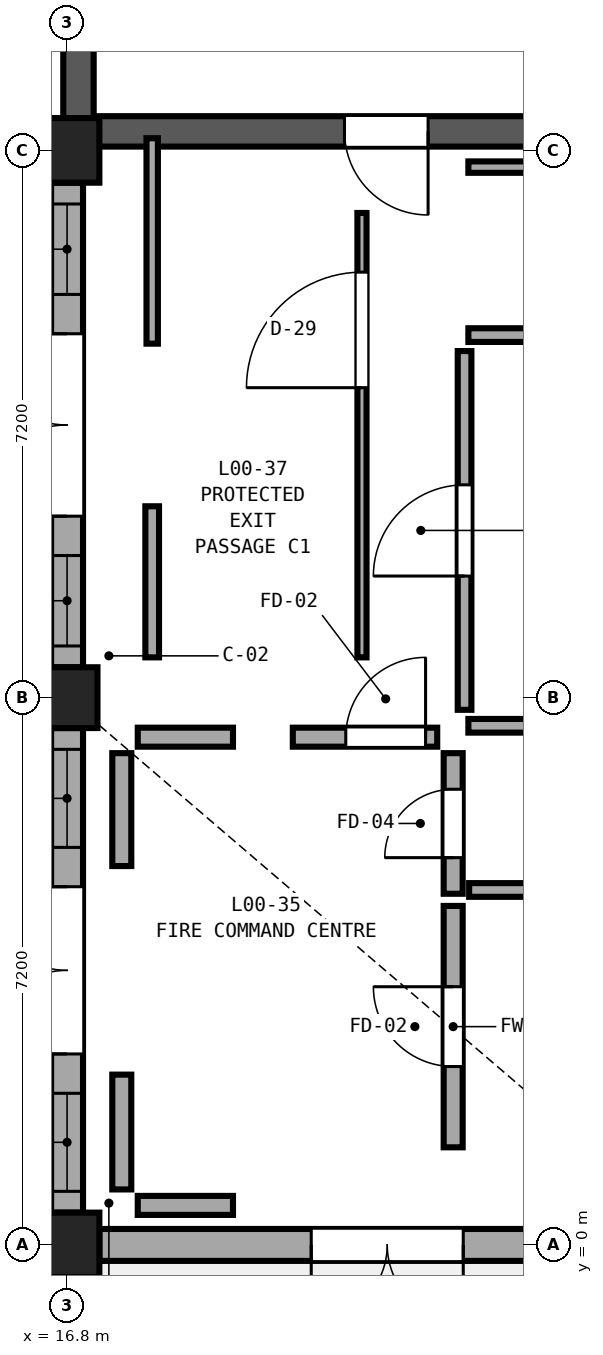
"""IFC4 building model, lengths in metres.
Left out: names, types, materials, properties, quantities, classifications, styles, units other than length and angle.
Written with IfcOpenShell. Run it as: python <this file> out.ifc"""

import sys

from ifc_helpers import new_model, si_unit, direction, frame, frame_2d, origin, origin_2d, place, context, subcontext, project, spatial, rectangle, extrude, element, fill, save


model = new_model("IFC4")
c1 = context("Model", 3, precision=1e-05, world=origin(), true_north=direction((0.0, 1.0)))
c2 = subcontext(c1, "Body", "Model", "MODEL_VIEW")
j1 = project(units=[si_unit("LENGTHUNIT", "METRE"), si_unit("PLANEANGLEUNIT", "RADIAN")], contexts=[c1])
p1 = place(None, origin())
s1 = spatial("IfcSite", under=j1, at=p1, CompositionType="ELEMENT")
p2 = place(p1, origin())
s2 = spatial("IfcBuilding", under=s1, at=p2, CompositionType="ELEMENT")
p3 = place(p2, origin())
s3 = spatial("IfcBuildingStorey", under=s2, at=p3, CompositionType="ELEMENT", Elevation=0.0)
p4 = place(p3, frame((16.8, 0.0, 0.0), z_axis=(0.0, 0.0, 1.0), x_axis=(1.0, 0.0, 0.0)))
e1 = element("IfcColumn", 1, at=p4, inside=s3, PredefinedType="COLUMN", context=c2, shape_type="SweptSolid", body=[
    extrude(rectangle(XDim=0.85, YDim=0.85, at=origin_2d()), origin(), (0.0, 0.0, 1.0), 5.4),
])
p5 = place(p3, frame((16.8, 7.2, 0.0), z_axis=(0.0, 0.0, 1.0), x_axis=(1.0, 0.0, 0.0)))
e2 = element("IfcColumn", 2, at=p5, inside=s3, PredefinedType="COLUMN", context=c2, shape_type="SweptSolid", body=[
    extrude(rectangle(XDim=0.8, YDim=0.8, at=origin_2d()), origin(), (0.0, 0.0, 1.0), 5.4),
])
p6 = place(p3, frame((16.8, 14.4, 0.0), z_axis=(0.0, 0.0, 1.0), x_axis=(1.0, 0.0, 0.0)))
e3 = element("IfcColumn", 3, at=p6, inside=s3, PredefinedType="COLUMN", context=c2, shape_type="SweptSolid", body=[
    extrude(rectangle(XDim=0.85, YDim=0.85, at=origin_2d()), origin(), (0.0, 0.0, 1.0), 5.4),
])
p7 = place(p3, frame((24.8, 0.0, 0.0), z_axis=(0.0, 0.0, 1.0), x_axis=(-1.0, 0.0, 0.0)))
e4 = element("IfcWall", 4, at=p7, inside=s3, PredefinedType="SOLIDWALL", context=c2, shape_type="SweptSolid", body=[
    extrude(rectangle(XDim=7.575, YDim=0.42, at=frame_2d((3.788, 0.0))), origin(), (0.0, 0.0, 1.0), 4.53),
])
p8 = place(p7, frame((2.788, 0.0, 0.0)))
e5 = element("IfcOpeningElement", 5, at=p8, cuts=e4, PredefinedType="OPENING", context=c2, shape_type="SweptSolid", body=[
    extrude(rectangle(XDim=2.0, YDim=2.4, at=frame_2d((1.0, 1.2))), frame((0.0, 0.23, 0.0), z_axis=(0.0, -1.0, 0.0), x_axis=(1.0, 0.0, 0.0)), (0.0, 0.0, 1.0), 0.46),
])
p9 = place(p3, frame((16.8, 0.425, 0.0), z_axis=(0.0, 0.0, 1.0), x_axis=(0.0, 1.0, 0.0)))
e6 = element("IfcWall", 6, at=p9, inside=s3, PredefinedType="SOLIDWALL", context=c2, shape_type="SweptSolid", body=[
    extrude(rectangle(XDim=6.375, YDim=0.42, at=frame_2d((3.188, 0.0))), origin(), (0.0, 0.0, 1.0), 4.53),
])
p10 = place(p9, frame((2.087, 0.0, 0.0)))
e7 = element("IfcOpeningElement", 7, at=p10, cuts=e6, PredefinedType="OPENING", context=c2, shape_type="SweptSolid", body=[
    extrude(rectangle(XDim=2.2, YDim=2.5, at=frame_2d((1.1, 1.25))), frame((0.0, 0.23, 0.0), z_axis=(0.0, -1.0, 0.0), x_axis=(1.0, 0.0, 0.0)), (0.0, 0.0, 1.0), 0.46),
])
p11 = place(p9, frame((0.28, 0.0, 0.65)))
e8 = element("IfcOpeningElement", 8, at=p11, cuts=e6, PredefinedType="OPENING", context=c2, shape_type="SweptSolid", body=[
    extrude(rectangle(XDim=1.29, YDim=2.68, at=frame_2d((0.645, 1.34))), frame((0.0, 0.23, 0.0), z_axis=(0.0, -1.0, 0.0), x_axis=(1.0, 0.0, 0.0)), (0.0, 0.0, 1.0), 0.46),
])
p12 = place(p9, frame((4.805, 0.0, 0.65)))
e9 = element("IfcOpeningElement", 9, at=p12, cuts=e6, PredefinedType="OPENING", context=c2, shape_type="SweptSolid", body=[
    extrude(rectangle(XDim=1.29, YDim=2.68, at=frame_2d((0.645, 1.34))), frame((0.0, 0.23, 0.0), z_axis=(0.0, -1.0, 0.0), x_axis=(1.0, 0.0, 0.0)), (0.0, 0.0, 1.0), 0.46),
])
p13 = place(p3, frame((16.8, 7.6, 0.0), z_axis=(0.0, 0.0, 1.0), x_axis=(0.0, 1.0, 0.0)))
e10 = element("IfcWall", 10, at=p13, inside=s3, PredefinedType="SOLIDWALL", context=c2, shape_type="SweptSolid", body=[
    extrude(rectangle(XDim=6.375, YDim=0.42, at=frame_2d((3.188, 0.0))), origin(), (0.0, 0.0, 1.0), 4.53),
])
p14 = place(p13, frame((1.988, 0.0, 0.0)))
e11 = element("IfcOpeningElement", 11, at=p14, cuts=e10, PredefinedType="OPENING", context=c2, shape_type="SweptSolid", body=[
    extrude(rectangle(XDim=2.4, YDim=2.6, at=frame_2d((1.2, 1.3))), frame((0.0, 0.23, 0.0), z_axis=(0.0, -1.0, 0.0), x_axis=(1.0, 0.0, 0.0)), (0.0, 0.0, 1.0), 0.46),
])
p15 = place(p13, frame((0.28, 0.0, 0.65)))
e12 = element("IfcOpeningElement", 12, at=p15, cuts=e10, PredefinedType="OPENING", context=c2, shape_type="SweptSolid", body=[
    extrude(rectangle(XDim=1.19, YDim=2.68, at=frame_2d((0.595, 1.34))), frame((0.0, 0.23, 0.0), z_axis=(0.0, -1.0, 0.0), x_axis=(1.0, 0.0, 0.0)), (0.0, 0.0, 1.0), 0.46),
])
p16 = place(p13, frame((4.905, 0.0, 0.65)))
e13 = element("IfcOpeningElement", 13, at=p16, cuts=e10, PredefinedType="OPENING", context=c2, shape_type="SweptSolid", body=[
    extrude(rectangle(XDim=1.19, YDim=2.68, at=frame_2d((0.595, 1.34))), frame((0.0, 0.23, 0.0), z_axis=(0.0, -1.0, 0.0), x_axis=(1.0, 0.0, 0.0)), (0.0, 0.0, 1.0), 0.46),
])
p17 = place(p3, frame((24.85, 14.65, 0.0), z_axis=(0.0, 0.0, 1.0), x_axis=(-1.0, 0.0, 0.0)))
e14 = element("IfcWall", 14, at=p17, inside=s3, PredefinedType="SHEAR", context=c2, shape_type="SweptSolid", body=[
    extrude(rectangle(XDim=7.7, YDim=0.4, at=frame_2d((3.85, 0.0))), origin(), (0.0, 0.0, 1.0), 5.4),
])
p18 = place(p17, frame((3.3, 0.0, 0.0)))
e15 = element("IfcOpeningElement", 15, at=p18, cuts=e14, PredefinedType="OPENING", context=c2, shape_type="SweptSolid", body=[
    extrude(rectangle(XDim=1.1, YDim=2.2, at=frame_2d((0.55, 1.1))), frame((0.0, 0.22, 0.0), z_axis=(0.0, -1.0, 0.0), x_axis=(1.0, 0.0, 0.0)), (0.0, 0.0, 1.0), 0.44),
])
p19 = place(p3, frame((16.95, 22.9, 0.0), z_axis=(0.0, 0.0, 1.0), x_axis=(0.0, -1.0, 0.0)))
e16 = element("IfcWall", 16, at=p19, inside=s3, PredefinedType="SHEAR", context=c2, shape_type="SweptSolid", body=[
    extrude(rectangle(XDim=8.45, YDim=0.4, at=frame_2d((4.225, 0.0))), origin(), (0.0, 0.0, 1.0), 5.4),
])
p20 = place(p3, frame((22.08, 6.83, 0.0), z_axis=(0.0, 0.0, 1.0), x_axis=(1.0, 0.0, 0.0)))
e17 = element("IfcWall", 17, at=p20, inside=s3, PredefinedType="PARTITIONING", context=c2, shape_type="SweptSolid", body=[
    extrude(rectangle(XDim=2.675, YDim=0.18, at=frame_2d((1.337, 0.0))), origin(), (0.0, 0.0, 1.0), 4.58),
])
p21 = place(p3, frame((22.08, 11.97, 0.0), z_axis=(0.0, 0.0, 1.0), x_axis=(1.0, 0.0, 0.0)))
e18 = element("IfcWall", 18, at=p21, inside=s3, PredefinedType="PARTITIONING", context=c2, shape_type="SweptSolid", body=[
    extrude(rectangle(XDim=11.98, YDim=0.18, at=frame_2d((5.99, 0.0))), origin(), (0.0, 0.0, 1.0), 5.08),
])
p22 = place(p21, frame((5.15, 0.0, 0.0)))
e19 = element("IfcOpeningElement", 19, at=p22, cuts=e18, PredefinedType="OPENING", context=c2, shape_type="SweptSolid", body=[
    extrude(rectangle(XDim=1.68, YDim=2.29, at=frame_2d((0.84, 1.145))), frame((0.0, 0.11, 0.0), z_axis=(0.0, -1.0, 0.0), x_axis=(1.0, 0.0, 0.0)), (0.0, 0.0, 1.0), 0.22),
])
p23 = place(p3, frame((22.08, 14.18, 0.0), z_axis=(0.0, 0.0, 1.0), x_axis=(1.0, 0.0, 0.0)))
e20 = element("IfcWall", 20, at=p23, inside=s3, PredefinedType="PARTITIONING", context=c2, shape_type="SweptSolid", body=[
    extrude(rectangle(XDim=2.7, YDim=0.15, at=frame_2d((1.35, 0.0))), origin(), (0.0, 0.0, 1.0), 4.58),
])
p24 = place(p3, frame((20.68, 7.73, 0.0), z_axis=(0.0, 0.0, 1.0), x_axis=(0.0, 1.0, 0.0)))
e21 = element("IfcWall", 21, at=p24, inside=s3, PredefinedType="PARTITIONING", context=c2, shape_type="SweptSolid", body=[
    extrude(rectangle(XDim=5.847, YDim=0.12, at=frame_2d((2.923, 0.0))), origin(), (0.0, 0.0, 1.0), 5.08),
])
p25 = place(p24, frame((3.548, 0.0, 0.0)))
e22 = element("IfcOpeningElement", 22, at=p25, cuts=e21, PredefinedType="OPENING", context=c2, shape_type="SweptSolid", body=[
    extrude(rectangle(XDim=1.52, YDim=2.37, at=frame_2d((0.76, 1.185))), frame((0.0, 0.08, 0.0), z_axis=(0.0, -1.0, 0.0), x_axis=(1.0, 0.0, 0.0)), (0.0, 0.0, 1.0), 0.16),
])
p26 = place(p3, frame((17.92, 7.73, 0.0), z_axis=(0.0, 0.0, 1.0), x_axis=(0.0, 1.0, 0.0)))
e23 = element("IfcWall", 23, at=p26, inside=s3, PredefinedType="PARTITIONING", context=c2, shape_type="SweptSolid", body=[
    extrude(rectangle(XDim=1.988, YDim=0.18, at=frame_2d((0.994, 0.0))), origin(), (0.0, 0.0, 1.0), 5.08),
])
p27 = place(p3, frame((17.92, 11.857, 0.0), z_axis=(0.0, 0.0, 1.0), x_axis=(0.0, 1.0, 0.0)))
e24 = element("IfcWall", 24, at=p27, inside=s3, PredefinedType="PARTITIONING", context=c2, shape_type="SweptSolid", body=[
    extrude(rectangle(XDim=2.703, YDim=0.15, at=frame_2d((1.352, 0.0))), origin(), (0.0, 0.0, 1.0), 5.08),
])
p28 = place(p3, frame((22.03, 7.04, 0.0), z_axis=(0.0, 0.0, 1.0), x_axis=(0.0, 1.0, 0.0)))
e25 = element("IfcWall", 25, at=p28, inside=s3, PredefinedType="PARTITIONING", context=c2, shape_type="SweptSolid", body=[
    extrude(rectangle(XDim=4.72, YDim=0.18, at=frame_2d((2.36, 0.0))), origin(), (0.0, 0.0, 1.0), 5.08),
])
p29 = place(p28, frame((1.76, 0.0, 0.0)))
e26 = element("IfcOpeningElement", 26, at=p29, cuts=e25, PredefinedType="OPENING", context=c2, shape_type="SweptSolid", body=[
    extrude(rectangle(XDim=1.2, YDim=2.21, at=frame_2d((0.6, 1.105))), frame((0.0, 0.11, 0.0), z_axis=(0.0, -1.0, 0.0), x_axis=(1.0, 0.0, 0.0)), (0.0, 0.0, 1.0), 0.22),
])
p30 = place(p3, frame((21.88, 1.284, 0.0), z_axis=(0.0, 0.0, 1.0), x_axis=(0.0, 1.0, 0.0)))
e27 = element("IfcWall", 27, at=p30, inside=s3, PredefinedType="SOLIDWALL", context=c2, shape_type="SweptSolid", body=[
    extrude(rectangle(XDim=3.176, YDim=0.25, at=frame_2d((1.588, 0.0))), origin(), (0.0, 0.0, 1.0), 5.08),
])
p31 = place(p30, frame((1.063, 0.0, 0.0)))
e28 = element("IfcOpeningElement", 28, at=p31, cuts=e27, PredefinedType="OPENING", context=c2, shape_type="SweptSolid", body=[
    extrude(rectangle(XDim=1.05, YDim=2.15, at=frame_2d((0.525, 1.075))), frame((0.0, 0.145, 0.0), z_axis=(0.0, -1.0, 0.0), x_axis=(1.0, 0.0, 0.0)), (0.0, 0.0, 1.0), 0.29),
])
p32 = place(p3, frame((22.09, 4.67, 0.0), z_axis=(0.0, 0.0, 1.0), x_axis=(1.0, 0.0, 0.0)))
e29 = element("IfcWall", 29, at=p32, inside=s3, PredefinedType="PARTITIONING", context=c2, shape_type="SweptSolid", body=[
    extrude(rectangle(XDim=3.725, YDim=0.18, at=frame_2d((1.862, 0.0))), origin(), (0.0, 0.0, 1.0), 5.08),
])
p33 = place(p32, frame((1.262, 0.0, 0.0)))
e30 = element("IfcOpeningElement", 30, at=p33, cuts=e29, PredefinedType="OPENING", context=c2, shape_type="SweptSolid", body=[
    extrude(rectangle(XDim=1.2, YDim=2.37, at=frame_2d((0.6, 1.185))), frame((0.0, 0.11, 0.0), z_axis=(0.0, -1.0, 0.0), x_axis=(1.0, 0.0, 0.0)), (0.0, 0.0, 1.0), 0.22),
])
p34 = place(p3, frame((19.77, 6.68, 0.0), z_axis=(0.0, 0.0, 1.0), x_axis=(1.0, 0.0, 0.0)))
e31 = element("IfcWall", 31, at=p34, inside=s3, PredefinedType="SOLIDWALL", context=c2, shape_type="SweptSolid", body=[
    extrude(rectangle(XDim=1.9, YDim=0.25, at=frame_2d((0.95, 0.0))), origin(), (0.0, 0.0, 1.0), 4.58),
])
p35 = place(p34, frame((0.697, 0.0, 0.0)))
e32 = element("IfcOpeningElement", 32, at=p35, cuts=e31, PredefinedType="OPENING", context=c2, shape_type="SweptSolid", body=[
    extrude(rectangle(XDim=1.05, YDim=2.15, at=frame_2d((0.525, 1.075))), frame((0.0, 0.145, 0.0), z_axis=(0.0, -1.0, 0.0), x_axis=(1.0, 0.0, 0.0)), (0.0, 0.0, 1.0), 0.29),
])
p36 = place(p3, frame((21.88, 4.62, 0.0), z_axis=(0.0, 0.0, 1.0), x_axis=(0.0, 1.0, 0.0)))
e33 = element("IfcWall", 33, at=p36, inside=s3, PredefinedType="SOLIDWALL", context=c2, shape_type="SweptSolid", body=[
    extrude(rectangle(XDim=1.85, YDim=0.25, at=frame_2d((0.925, 0.0))), origin(), (0.0, 0.0, 1.0), 5.08),
])
p37 = place(p36, frame((0.475, 0.0, 0.0)))
e34 = element("IfcOpeningElement", 34, at=p37, cuts=e33, PredefinedType="OPENING", context=c2, shape_type="SweptSolid", body=[
    extrude(rectangle(XDim=0.9, YDim=2.1, at=frame_2d((0.45, 1.05))), frame((0.0, 0.145, 0.0), z_axis=(0.0, -1.0, 0.0), x_axis=(1.0, 0.0, 0.0)), (0.0, 0.0, 1.0), 0.29),
])
p38 = place(p3, frame((17.52, 0.73, 0.0), z_axis=(0.0, 0.0, 1.0), x_axis=(0.0, 1.0, 0.0)))
e35 = element("IfcWall", 35, at=p38, inside=s3, PredefinedType="SOLIDWALL", context=c2, shape_type="SweptSolid", body=[
    extrude(rectangle(XDim=1.51, YDim=0.25, at=frame_2d((0.755, 0.0))), origin(), (0.0, 0.0, 1.0), 4.53),
])
p39 = place(p3, frame((17.52, 4.985, 0.0), z_axis=(0.0, 0.0, 1.0), x_axis=(0.0, 1.0, 0.0)))
e36 = element("IfcWall", 36, at=p39, inside=s3, PredefinedType="SOLIDWALL", context=c2, shape_type="SweptSolid", body=[
    extrude(rectangle(XDim=1.485, YDim=0.25, at=frame_2d((0.743, 0.0))), origin(), (0.0, 0.0, 1.0), 4.53),
])
p40 = place(p3, frame((17.73, 0.52, 0.0), z_axis=(0.0, 0.0, 1.0), x_axis=(1.0, 0.0, 0.0)))
e37 = element("IfcWall", 37, at=p40, inside=s3, PredefinedType="SOLIDWALL", context=c2, shape_type="SweptSolid", body=[
    extrude(rectangle(XDim=1.253, YDim=0.25, at=frame_2d((0.626, 0.0))), origin(), (0.0, 0.0, 1.0), 4.53),
])
p41 = place(p3, frame((17.73, 6.68, 0.0), z_axis=(0.0, 0.0, 1.0), x_axis=(1.0, 0.0, 0.0)))
e38 = element("IfcWall", 38, at=p41, inside=s3, PredefinedType="SOLIDWALL", context=c2, shape_type="SweptSolid", body=[
    extrude(rectangle(XDim=1.253, YDim=0.25, at=frame_2d((0.626, 0.0))), origin(), (0.0, 0.0, 1.0), 4.58),
])
p42 = place(p8, origin())
e39 = element("IfcDoor", 39, at=p42, inside=s3, OperationType="DOUBLE_DOOR_SINGLE_SWING", PredefinedType="DOOR", context=c2, shape_type="SweptSolid", body=[
    extrude(rectangle(XDim=2.0, YDim=2.4, at=frame_2d((1.0, 1.2))), frame((0.0, 0.025, 0.0), z_axis=(0.0, -1.0, 0.0), x_axis=(1.0, 0.0, 0.0)), (0.0, 0.0, 1.0), 0.05),
])
fill(e5, e39)
p43 = place(p10, origin())
e40 = element("IfcDoor", 40, at=p43, inside=s3, OperationType="DOUBLE_DOOR_SINGLE_SWING", PredefinedType="DOOR", context=c2, shape_type="SweptSolid", body=[
    extrude(rectangle(XDim=2.2, YDim=2.5, at=frame_2d((1.1, 1.25))), frame((0.0, 0.025, 0.0), z_axis=(0.0, -1.0, 0.0), x_axis=(1.0, 0.0, 0.0)), (0.0, 0.0, 1.0), 0.05),
])
fill(e7, e40)
p44 = place(p11, origin())
e41 = element("IfcWindow", 41, at=p44, inside=s3, PartitioningType="DOUBLE_PANEL_VERTICAL", PredefinedType="WINDOW", context=c2, shape_type="SweptSolid", body=[
    extrude(rectangle(XDim=1.29, YDim=2.68, at=frame_2d((0.645, 1.34))), frame((0.0, 0.03, 0.0), z_axis=(0.0, -1.0, 0.0), x_axis=(1.0, 0.0, 0.0)), (0.0, 0.0, 1.0), 0.06),
])
fill(e8, e41)
p45 = place(p12, origin())
e42 = element("IfcWindow", 42, at=p45, inside=s3, PartitioningType="DOUBLE_PANEL_VERTICAL", PredefinedType="WINDOW", context=c2, shape_type="SweptSolid", body=[
    extrude(rectangle(XDim=1.29, YDim=2.68, at=frame_2d((0.645, 1.34))), frame((0.0, 0.03, 0.0), z_axis=(0.0, -1.0, 0.0), x_axis=(1.0, 0.0, 0.0)), (0.0, 0.0, 1.0), 0.06),
])
fill(e9, e42)
p46 = place(p14, origin())
e43 = element("IfcDoor", 43, at=p46, inside=s3, OperationType="DOUBLE_DOOR_SINGLE_SWING", PredefinedType="DOOR", context=c2, shape_type="SweptSolid", body=[
    extrude(rectangle(XDim=2.4, YDim=2.6, at=frame_2d((1.2, 1.3))), frame((0.0, 0.025, 0.0), z_axis=(0.0, -1.0, 0.0), x_axis=(1.0, 0.0, 0.0)), (0.0, 0.0, 1.0), 0.05),
])
fill(e11, e43)
p47 = place(p15, origin())
e44 = element("IfcWindow", 44, at=p47, inside=s3, PartitioningType="DOUBLE_PANEL_VERTICAL", PredefinedType="WINDOW", context=c2, shape_type="SweptSolid", body=[
    extrude(rectangle(XDim=1.19, YDim=2.68, at=frame_2d((0.595, 1.34))), frame((0.0, 0.03, 0.0), z_axis=(0.0, -1.0, 0.0), x_axis=(1.0, 0.0, 0.0)), (0.0, 0.0, 1.0), 0.06),
])
fill(e12, e44)
p48 = place(p16, origin())
e45 = element("IfcWindow", 45, at=p48, inside=s3, PartitioningType="DOUBLE_PANEL_VERTICAL", PredefinedType="WINDOW", context=c2, shape_type="SweptSolid", body=[
    extrude(rectangle(XDim=1.19, YDim=2.68, at=frame_2d((0.595, 1.34))), frame((0.0, 0.03, 0.0), z_axis=(0.0, -1.0, 0.0), x_axis=(1.0, 0.0, 0.0)), (0.0, 0.0, 1.0), 0.06),
])
fill(e13, e45)
p49 = place(p18, origin())
e46 = element("IfcDoor", 46, at=p49, inside=s3, OperationType="SINGLE_SWING_LEFT", PredefinedType="DOOR", context=c2, shape_type="SweptSolid", body=[
    extrude(rectangle(XDim=1.1, YDim=2.2, at=frame_2d((0.55, 1.1))), frame((0.0, 0.025, 0.0), z_axis=(0.0, -1.0, 0.0), x_axis=(1.0, 0.0, 0.0)), (0.0, 0.0, 1.0), 0.05),
])
fill(e15, e46)
p50 = place(p25, frame((1.52, 0.0, 0.0), z_axis=(0.0, 0.0, 1.0), x_axis=(-1.0, 0.0, 0.0)))
e47 = element("IfcDoor", 47, at=p50, inside=s3, OperationType="SINGLE_SWING_LEFT", PredefinedType="DOOR", context=c2, shape_type="SweptSolid", body=[
    extrude(rectangle(XDim=1.52, YDim=2.37, at=frame_2d((0.76, 1.185))), frame((0.0, 0.025, 0.0), z_axis=(0.0, -1.0, 0.0), x_axis=(1.0, 0.0, 0.0)), (0.0, 0.0, 1.0), 0.05),
])
fill(e22, e47)
p51 = place(p29, frame((1.2, 0.0, 0.0), z_axis=(0.0, 0.0, 1.0), x_axis=(-1.0, 0.0, 0.0)))
e48 = element("IfcDoor", 48, at=p51, inside=s3, OperationType="SINGLE_SWING_LEFT", PredefinedType="DOOR", context=c2, shape_type="SweptSolid", body=[
    extrude(rectangle(XDim=1.2, YDim=2.21, at=frame_2d((0.6, 1.105))), frame((0.0, 0.025, 0.0), z_axis=(0.0, -1.0, 0.0), x_axis=(1.0, 0.0, 0.0)), (0.0, 0.0, 1.0), 0.05),
])
fill(e26, e48)
p52 = place(p31, origin())
e49 = element("IfcDoor", 49, at=p52, inside=s3, OperationType="SINGLE_SWING_RIGHT", PredefinedType="DOOR", context=c2, shape_type="SweptSolid", body=[
    extrude(rectangle(XDim=1.05, YDim=2.15, at=frame_2d((0.525, 1.075))), frame((0.0, 0.025, 0.0), z_axis=(0.0, -1.0, 0.0), x_axis=(1.0, 0.0, 0.0)), (0.0, 0.0, 1.0), 0.05),
])
fill(e28, e49)
p53 = place(p35, frame((1.05, 0.0, 0.0), z_axis=(0.0, 0.0, 1.0), x_axis=(-1.0, 0.0, 0.0)))
e50 = element("IfcDoor", 50, at=p53, inside=s3, OperationType="SINGLE_SWING_RIGHT", PredefinedType="DOOR", context=c2, shape_type="SweptSolid", body=[
    extrude(rectangle(XDim=1.05, YDim=2.15, at=frame_2d((0.525, 1.075))), frame((0.0, 0.025, 0.0), z_axis=(0.0, -1.0, 0.0), x_axis=(1.0, 0.0, 0.0)), (0.0, 0.0, 1.0), 0.05),
])
fill(e32, e50)
p54 = place(p37, origin())
e51 = element("IfcDoor", 51, at=p54, inside=s3, OperationType="SINGLE_SWING_LEFT", PredefinedType="DOOR", context=c2, shape_type="SweptSolid", body=[
    extrude(rectangle(XDim=0.9, YDim=2.1, at=frame_2d((0.45, 1.05))), frame((0.0, 0.025, 0.0), z_axis=(0.0, -1.0, 0.0), x_axis=(1.0, 0.0, 0.0)), (0.0, 0.0, 1.0), 0.05),
])
fill(e34, e51)
save(model, sys.argv[1])
